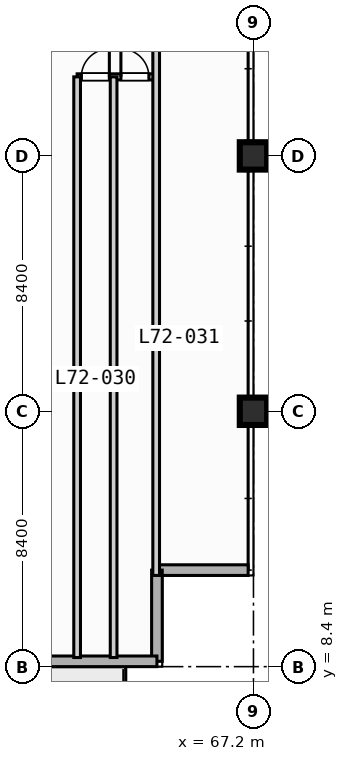
"""IFC4 building model, lengths in metres.
Left out: names, types, materials, properties, quantities, classifications, styles, units other than length and angle.
Written with IfcOpenShell. Run it as: python <this file> out.ifc"""

import sys

from ifc_helpers import new_model, si_unit, direction, frame, frame_2d, origin, origin_2d, place, context, subcontext, project, spatial, rectangle, extrude, element, fill, save


model = new_model("IFC4")
c1 = context("Model", 3, precision=1e-05, world=origin(), true_north=direction((0.0, 1.0)))
c2 = subcontext(c1, "Body", "Model", "MODEL_VIEW")
j1 = project(units=[si_unit("LENGTHUNIT", "METRE"), si_unit("PLANEANGLEUNIT", "RADIAN")], contexts=[c1])
p1 = place(None, origin())
s1 = spatial("IfcSite", under=j1, at=p1, CompositionType="ELEMENT")
p2 = place(p1, origin())
s2 = spatial("IfcBuilding", under=s1, at=p2, CompositionType="ELEMENT")
p3 = place(p2, frame((0.0, 0.0, 290.4)))
s3 = spatial("IfcBuildingStorey", under=s2, at=p3, CompositionType="ELEMENT", Elevation=290.4)
for number, where, z_axis, x_axis in (
    (1, (67.2, 16.8, 0.0), (0.0, 0.0, 1.0), (1.0, 0.0, 0.0)),
    (2, (67.2, 25.2, 0.0), (0.0, 0.0, 1.0), (1.0, 0.0, 0.0)),
):
    element("IfcColumn", number, at=place(p3, frame(where, z_axis=z_axis, x_axis=x_axis)), inside=s3, PredefinedType="COLUMN", context=c2, shape_type="SweptSolid", body=[
        extrude(rectangle(XDim=0.9, YDim=0.9, at=origin_2d()), origin(), (0.0, 0.0, 1.0), 4.4),
    ])
for number, where, z_axis, x_axis in (
    (3, (67.025, 11.575, 0.0), (0.0, 0.0, 1.0), (-1.0, 0.0, 0.0)),
    (4, (64.025, 11.575, 0.0), (0.0, 0.0, 1.0), (0.0, -1.0, 0.0)),
):
    element("IfcWall", number, at=place(p3, frame(where, z_axis=z_axis, x_axis=x_axis)), inside=s3, PredefinedType="STANDARD", context=c2, shape_type="SweptSolid", body=[
        extrude(rectangle(XDim=3.0, YDim=0.35, at=frame_2d((1.5, 0.0))), origin(), (0.0, 0.0, 1.0), 4.05),
    ])
p4 = place(p3, frame((64.025, 8.575, 0.0), z_axis=(0.0, 0.0, 1.0), x_axis=(-1.0, 0.0, 0.0)))
e5 = element("IfcWall", 5, at=p4, inside=s3, PredefinedType="STANDARD", context=c2, shape_type="SweptSolid", body=[
    extrude(rectangle(XDim=52.45, YDim=0.35, at=frame_2d((26.225, 0.0))), origin(), (0.0, 0.0, 1.0), 4.05),
])
p5 = place(p4, frame((33.925, 0.0, 0.0)))
e6 = element("IfcOpeningElement", 6, at=p5, cuts=e5, PredefinedType="OPENING", context=c2, shape_type="SweptSolid", body=[
    extrude(rectangle(XDim=1.4, YDim=2.2, at=frame_2d((0.7, 1.1))), frame((0.0, 0.185, 0.0), z_axis=(0.0, -1.0, 0.0), x_axis=(1.0, 0.0, 0.0)), (0.0, 0.0, 1.0), 0.37),
])
p6 = place(p4, frame((16.575, 0.0, 0.85)))
e7 = element("IfcOpeningElement", 7, at=p6, cuts=e5, PredefinedType="OPENING", context=c2, shape_type="SweptSolid", body=[
    extrude(rectangle(XDim=2.5, YDim=2.2, at=frame_2d((1.25, 1.1))), frame((0.0, 0.185, 0.0), z_axis=(0.0, -1.0, 0.0), x_axis=(1.0, 0.0, 0.0)), (0.0, 0.0, 1.0), 0.37),
])
p7 = place(p4, frame((8.175, 0.0, 0.85)))
e8 = element("IfcOpeningElement", 8, at=p7, cuts=e5, PredefinedType="OPENING", context=c2, shape_type="SweptSolid", body=[
    extrude(rectangle(XDim=2.5, YDim=2.2, at=frame_2d((1.25, 1.1))), frame((0.0, 0.185, 0.0), z_axis=(0.0, -1.0, 0.0), x_axis=(1.0, 0.0, 0.0)), (0.0, 0.0, 1.0), 0.37),
])
p8 = place(p3, frame((61.4, 27.8, 0.0), z_axis=(0.0, 0.0, 1.0), x_axis=(1.0, 0.0, 0.0)))
e9 = element("IfcWall", 9, at=p8, inside=s3, PredefinedType="PARTITIONING", context=c2, shape_type="SweptSolid", body=[
    extrude(rectangle(XDim=2.6, YDim=0.2, at=frame_2d((1.3, 0.0))), origin(), (0.0, 0.0, 1.0), 4.05),
])
p9 = place(p8, frame((0.14, 0.0, 0.0)))
e10 = element("IfcOpeningElement", 10, at=p9, cuts=e9, PredefinedType="OPENING", context=c2, shape_type="SweptSolid", body=[
    extrude(rectangle(XDim=0.92, YDim=2.1, at=frame_2d((0.46, 1.05))), frame((0.0, 0.11, 0.0), z_axis=(0.0, -1.0, 0.0), x_axis=(1.0, 0.0, 0.0)), (0.0, 0.0, 1.0), 0.22),
])
p10 = place(p8, frame((1.44, 0.0, 0.0)))
e11 = element("IfcOpeningElement", 11, at=p10, cuts=e9, PredefinedType="OPENING", context=c2, shape_type="SweptSolid", body=[
    extrude(rectangle(XDim=0.92, YDim=2.1, at=frame_2d((0.46, 1.05))), frame((0.0, 0.11, 0.0), z_axis=(0.0, -1.0, 0.0), x_axis=(1.0, 0.0, 0.0)), (0.0, 0.0, 1.0), 0.22),
])
p11 = place(p3, frame((61.4, 8.7, 0.0), z_axis=(0.0, 0.0, 1.0), x_axis=(0.0, 1.0, 0.0)))
e12 = element("IfcWall", 12, at=p11, inside=s3, PredefinedType="PARTITIONING", context=c2, shape_type="SweptSolid", body=[
    extrude(rectangle(XDim=19.1, YDim=0.22, at=frame_2d((9.55, 0.0))), origin(), (0.0, 0.0, 1.0), 4.05),
])
p12 = place(p3, frame((64.0, 11.4, 0.0), z_axis=(0.0, 0.0, 1.0), x_axis=(0.0, 1.0, 0.0)))
e13 = element("IfcWall", 13, at=p12, inside=s3, PredefinedType="PARTITIONING", context=c2, shape_type="SweptSolid", body=[
    extrude(rectangle(XDim=19.0, YDim=0.22, at=frame_2d((9.5, 0.0))), origin(), (0.0, 0.0, 1.0), 4.05),
])
p13 = place(p3, frame((62.6, 8.7, 0.0), z_axis=(0.0, 0.0, 1.0), x_axis=(0.0, 1.0, 0.0)))
e14 = element("IfcWall", 14, at=p13, inside=s3, PredefinedType="PARTITIONING", context=c2, shape_type="SweptSolid", body=[
    extrude(rectangle(XDim=19.1, YDim=0.22, at=frame_2d((9.55, 0.0))), origin(), (0.0, 0.0, 1.0), 4.05),
])
p14 = place(p9, origin())
e15 = element("IfcDoor", 15, at=p14, inside=s3, OperationType="SINGLE_SWING_RIGHT", PredefinedType="DOOR", context=c2, shape_type="SweptSolid", body=[
    extrude(rectangle(XDim=0.92, YDim=2.1, at=frame_2d((0.46, 1.05))), frame((0.0, 0.025, 0.0), z_axis=(0.0, -1.0, 0.0), x_axis=(1.0, 0.0, 0.0)), (0.0, 0.0, 1.0), 0.05),
])
fill(e10, e15)
p15 = place(p10, origin())
e16 = element("IfcDoor", 16, at=p15, inside=s3, OperationType="SINGLE_SWING_LEFT", PredefinedType="DOOR", context=c2, shape_type="SweptSolid", body=[
    extrude(rectangle(XDim=0.92, YDim=2.1, at=frame_2d((0.46, 1.05))), frame((0.0, 0.025, 0.0), z_axis=(0.0, -1.0, 0.0), x_axis=(1.0, 0.0, 0.0)), (0.0, 0.0, 1.0), 0.05),
])
fill(e11, e16)
save(model, sys.argv[1])
